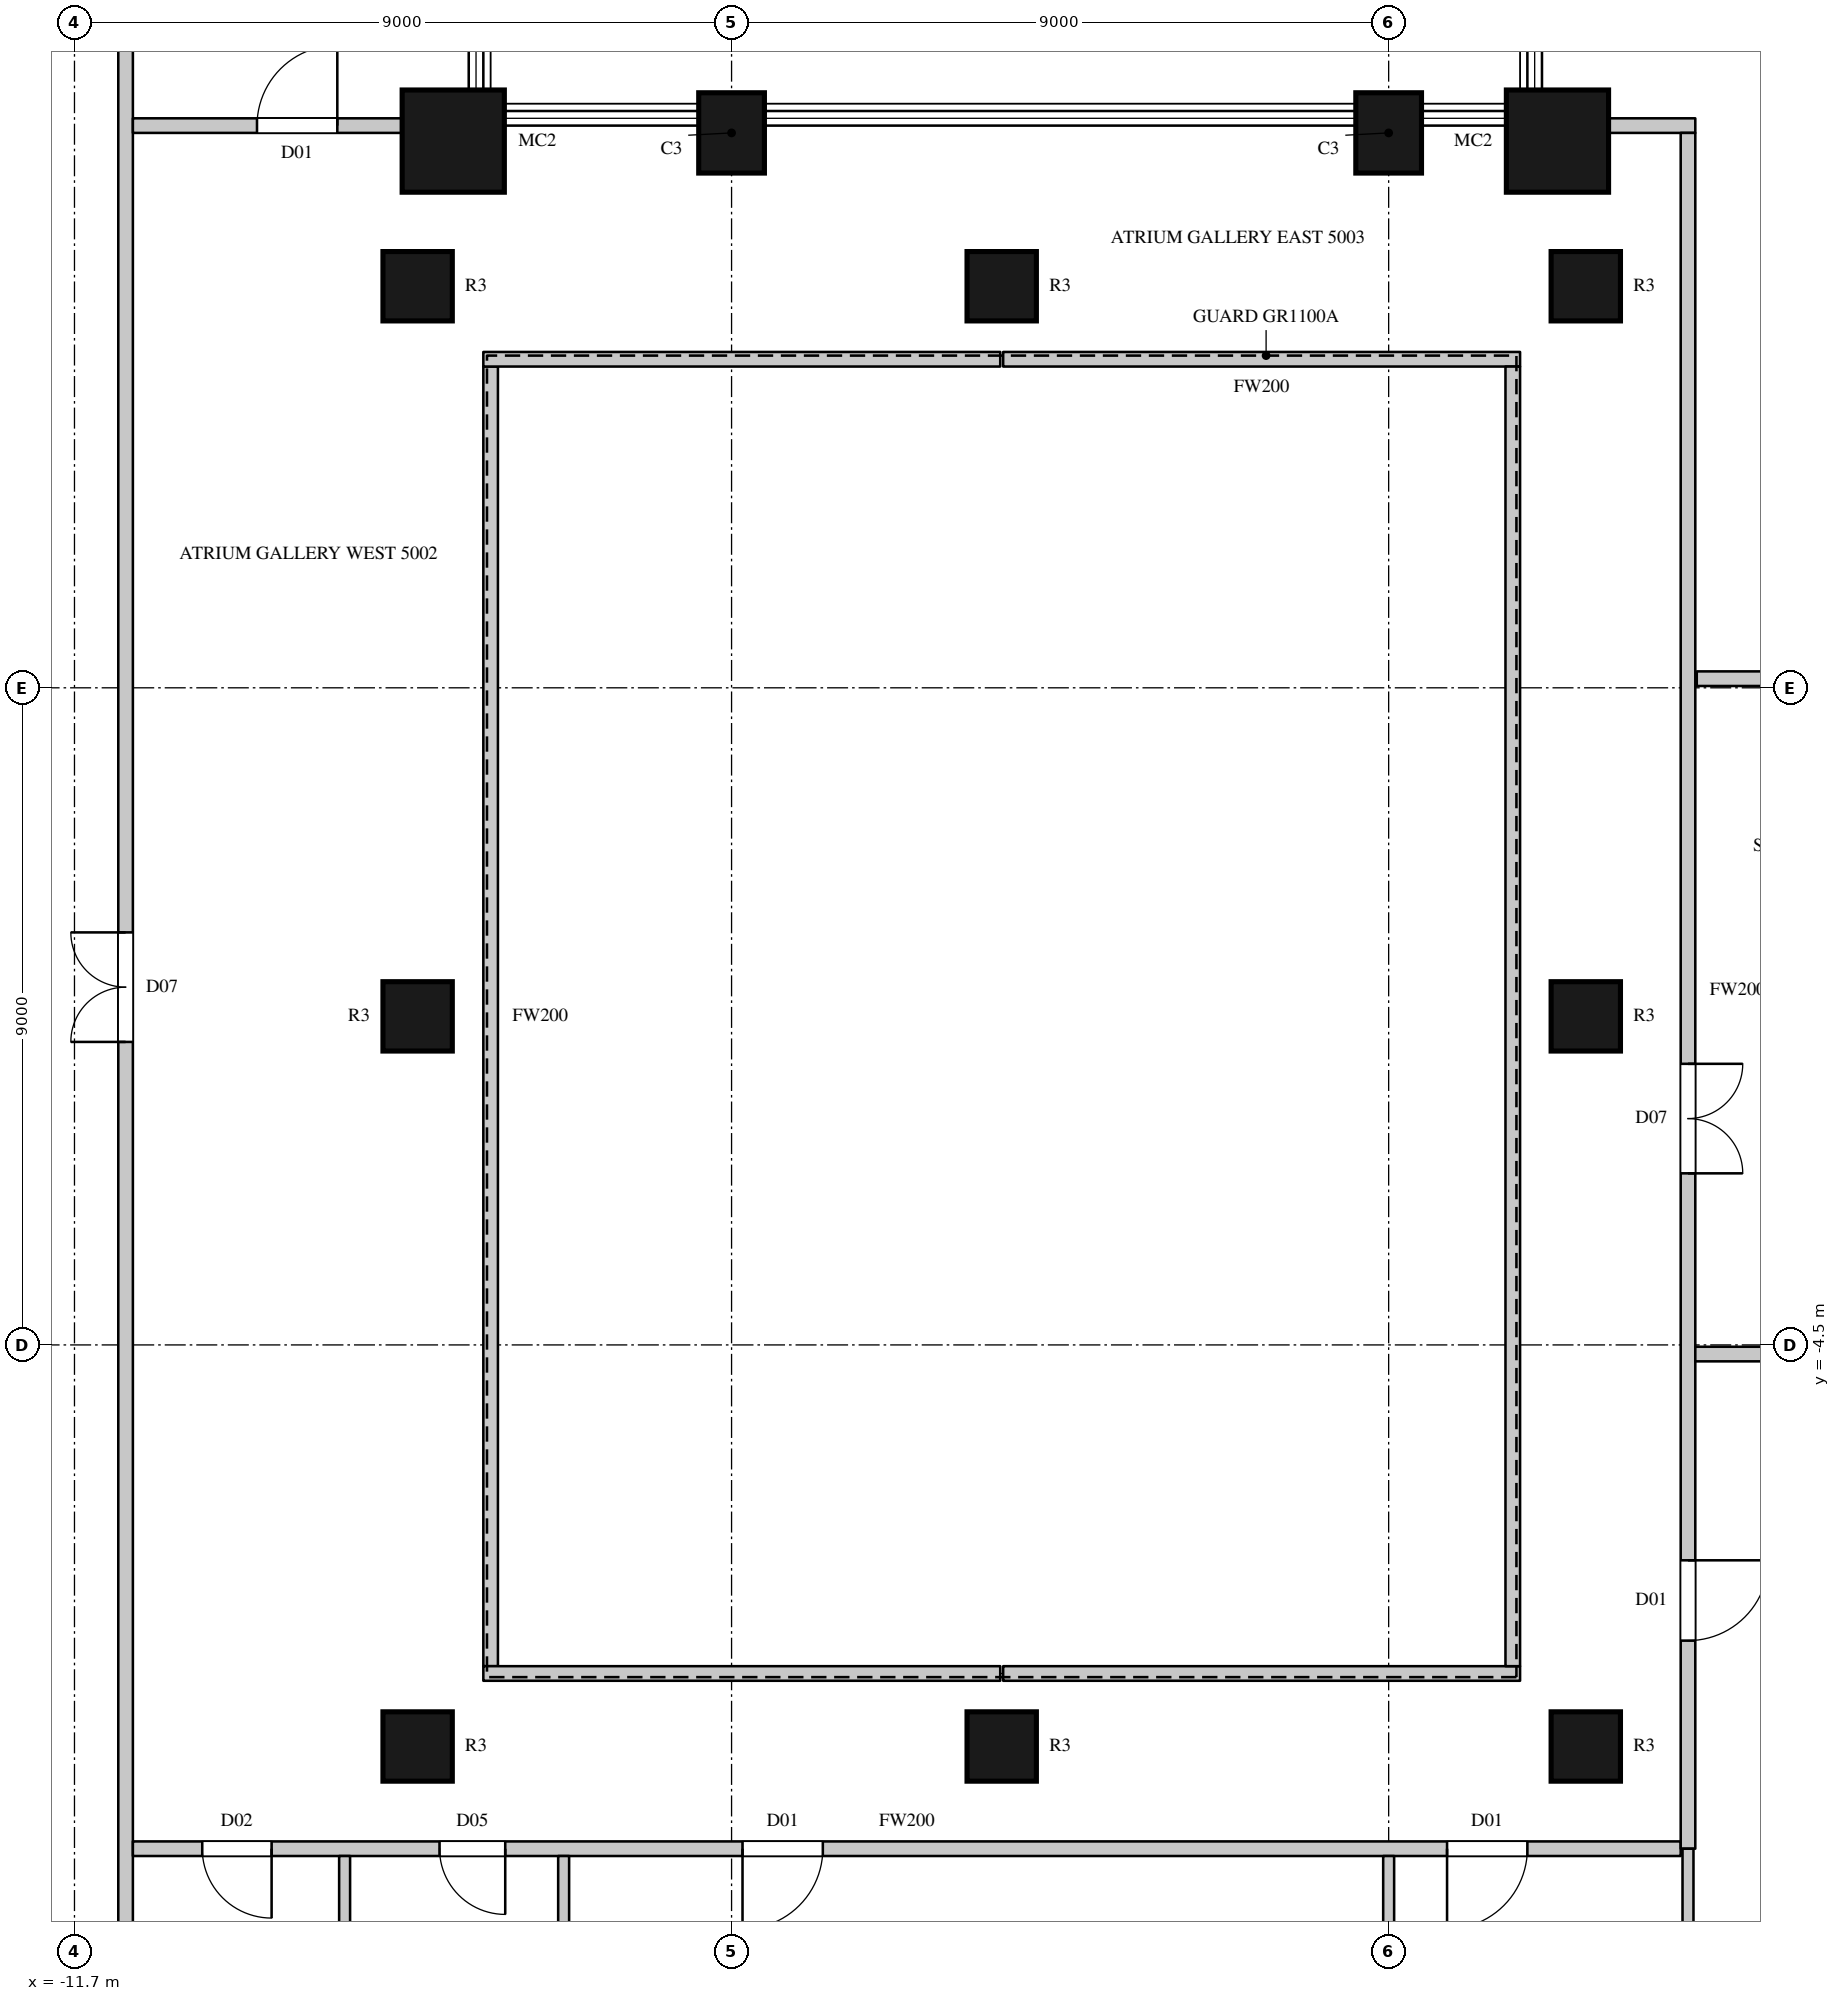
"""IFC4 building model, lengths in metres.
Left out: names, types, materials, properties, quantities, classifications, styles, units other than length and angle.
Written with IfcOpenShell. Run it as: python <this file> out.ifc"""

import sys

from ifc_helpers import new_model, si_unit, direction, frame, frame_2d, origin, origin_2d, place, context, subcontext, project, spatial, rectangle, circle, extrude, element, fill, save


model = new_model("IFC4")
c1 = context("Model", 3, precision=1e-05, world=origin(), true_north=direction((0.0, 1.0)))
c2 = subcontext(c1, "Body", "Model", "MODEL_VIEW")
j1 = project(units=[si_unit("LENGTHUNIT", "METRE"), si_unit("PLANEANGLEUNIT", "RADIAN")], contexts=[c1])
p1 = place(None, origin())
s1 = spatial("IfcSite", under=j1, at=p1, CompositionType="ELEMENT")
p2 = place(p1, origin())
s2 = spatial("IfcBuilding", under=s1, at=p2, CompositionType="ELEMENT")
p3 = place(p2, frame((0.0, 0.0, 226.1)))
s3 = spatial("IfcBuildingStorey", under=s2, at=p3, CompositionType="ELEMENT", Elevation=226.1)
p4 = place(p3, frame((8.612, 11.988, 0.0), z_axis=(0.0, 0.0, 1.0), x_axis=(1.0, 0.0, 0.0)))
e1 = element("IfcColumn", 1, at=p4, inside=s3, PredefinedType="COLUMN", context=c2, shape_type="SweptSolid", body=[
    extrude(circle(Radius=0.7, at=origin_2d()), origin(), (0.0, 0.0, 1.0), 4.1),
])
for number, where, z_axis, x_axis in (
    (2, (6.3, 12.1, 0.0), (0.0, 0.0, 1.0), (-1.0, 0.0, 0.0)),
    (3, (-2.7, 12.1, 0.0), (0.0, 0.0, 1.0), (-1.0, 0.0, 0.0)),
):
    element("IfcColumn", number, at=place(p3, frame(where, z_axis=z_axis, x_axis=x_axis)), inside=s3, PredefinedType="COLUMN", context=c2, shape_type="SweptSolid", body=[
        extrude(rectangle(XDim=0.9, YDim=1.1, at=origin_2d()), origin(), (0.0, 0.0, 1.0), 4.1),
    ])
p5 = place(p3, frame((-6.512, 11.988, 0.0), z_axis=(0.0, 0.0, 1.0), x_axis=(1.0, 0.0, 0.0)))
e4 = element("IfcColumn", 4, at=p5, inside=s3, PredefinedType="COLUMN", context=c2, shape_type="SweptSolid", body=[
    extrude(circle(Radius=0.7, at=origin_2d()), origin(), (0.0, 0.0, 1.0), 4.1),
])
for number, where, z_axis, x_axis in (
    (5, (-7.0, -10.0, 0.0), (0.0, 0.0, 1.0), (1.0, 0.0, 0.0)),
    (6, (-7.0, 0.0, 0.0), (0.0, 0.0, 1.0), (1.0, 0.0, 0.0)),
    (7, (-7.0, 10.0, 0.0), (0.0, 0.0, 1.0), (1.0, 0.0, 0.0)),
    (8, (1.0, -10.0, 0.0), (0.0, 0.0, 1.0), (1.0, 0.0, 0.0)),
    (9, (1.0, 10.0, 0.0), (0.0, 0.0, 1.0), (1.0, 0.0, 0.0)),
    (10, (9.0, -10.0, 0.0), (0.0, 0.0, 1.0), (1.0, 0.0, 0.0)),
    (11, (9.0, 0.0, 0.0), (0.0, 0.0, 1.0), (1.0, 0.0, 0.0)),
    (12, (9.0, 10.0, 0.0), (0.0, 0.0, 1.0), (1.0, 0.0, 0.0)),
):
    element("IfcColumn", number, at=place(p3, frame(where, z_axis=z_axis, x_axis=x_axis)), inside=s3, PredefinedType="COLUMN", context=c2, shape_type="SweptSolid", body=[
        extrude(circle(Radius=0.475, at=origin_2d()), origin(), (0.0, 0.0, 1.0), 4.1),
    ])
p6 = place(p3, frame((13.941, 11.053, 0.0), z_axis=(0.0, 0.0, 1.0), x_axis=(-0.707106781187, 0.707106781187, 0.0)))
e13 = element("IfcWall", 13, at=p6, inside=s3, PredefinedType="SOLIDWALL", context=c2, shape_type="SweptSolid", body=[
    extrude(rectangle(XDim=6.505, YDim=0.45, at=frame_2d((3.252, 0.0))), origin(), (0.0, 0.0, 1.0), 3.8),
])
p7 = place(p6, frame((0.665, 0.0, 0.0)))
e14 = element("IfcOpeningElement", 14, at=p7, cuts=e13, PredefinedType="OPENING", context=c2, shape_type="SweptSolid", body=[
    extrude(rectangle(XDim=1.8, YDim=2.4, at=frame_2d((0.9, 1.2))), frame((0.0, 0.235, 0.0), z_axis=(0.0, -1.0, 0.0), x_axis=(1.0, 0.0, 0.0)), (0.0, 0.0, 1.0), 0.47),
])
p8 = place(p3, frame((-11.0, -14.8, 0.0), z_axis=(0.0, 0.0, 1.0), x_axis=(0.0, 1.0, 0.0)))
e15 = element("IfcWall", 15, at=p8, inside=s3, PredefinedType="PARTITIONING", context=c2, shape_type="SweptSolid", body=[
    extrude(rectangle(XDim=29.6, YDim=0.2, at=frame_2d((14.8, 0.0))), origin(), (0.0, 0.0, 1.0), 3.8),
])
p9 = place(p8, frame((14.45, 0.0, 0.0)))
e16 = element("IfcOpeningElement", 16, at=p9, cuts=e15, PredefinedType="OPENING", context=c2, shape_type="SweptSolid", body=[
    extrude(rectangle(XDim=1.5, YDim=2.4, at=frame_2d((0.75, 1.2))), frame((0.0, 0.11, 0.0), z_axis=(0.0, -1.0, 0.0), x_axis=(1.0, 0.0, 0.0)), (0.0, 0.0, 1.0), 0.22),
])
p10 = place(p3, frame((-10.9, -11.4, 0.0), z_axis=(0.0, 0.0, 1.0), x_axis=(1.0, 0.0, 0.0)))
e17 = element("IfcWall", 17, at=p10, inside=s3, PredefinedType="PARTITIONING", context=c2, shape_type="SweptSolid", body=[
    extrude(rectangle(XDim=21.2, YDim=0.2, at=frame_2d((10.6, 0.0))), origin(), (0.0, 0.0, 1.0), 3.8),
])
p11 = place(p10, frame((0.95, 0.0, 0.0)))
e18 = element("IfcOpeningElement", 18, at=p11, cuts=e17, PredefinedType="OPENING", context=c2, shape_type="SweptSolid", body=[
    extrude(rectangle(XDim=0.95, YDim=2.2, at=frame_2d((0.475, 1.1))), frame((0.0, 0.11, 0.0), z_axis=(0.0, -1.0, 0.0), x_axis=(1.0, 0.0, 0.0)), (0.0, 0.0, 1.0), 0.22),
])
p12 = place(p10, frame((4.2, 0.0, 0.0)))
e19 = element("IfcOpeningElement", 19, at=p12, cuts=e17, PredefinedType="OPENING", context=c2, shape_type="SweptSolid", body=[
    extrude(rectangle(XDim=0.9, YDim=2.2, at=frame_2d((0.45, 1.1))), frame((0.0, 0.11, 0.0), z_axis=(0.0, -1.0, 0.0), x_axis=(1.0, 0.0, 0.0)), (0.0, 0.0, 1.0), 0.22),
])
p13 = place(p10, frame((8.35, 0.0, 0.0)))
e20 = element("IfcOpeningElement", 20, at=p13, cuts=e17, PredefinedType="OPENING", context=c2, shape_type="SweptSolid", body=[
    extrude(rectangle(XDim=1.1, YDim=2.4, at=frame_2d((0.55, 1.2))), frame((0.0, 0.11, 0.0), z_axis=(0.0, -1.0, 0.0), x_axis=(1.0, 0.0, 0.0)), (0.0, 0.0, 1.0), 0.22),
])
p14 = place(p10, frame((18.0, 0.0, 0.0)))
e21 = element("IfcOpeningElement", 21, at=p14, cuts=e17, PredefinedType="OPENING", context=c2, shape_type="SweptSolid", body=[
    extrude(rectangle(XDim=1.1, YDim=2.4, at=frame_2d((0.55, 1.2))), frame((0.0, 0.11, 0.0), z_axis=(0.0, -1.0, 0.0), x_axis=(1.0, 0.0, 0.0)), (0.0, 0.0, 1.0), 0.22),
])
p15 = place(p3, frame((-10.9, 12.2, 0.0), z_axis=(0.0, 0.0, 1.0), x_axis=(1.0, 0.0, 0.0)))
e22 = element("IfcWall", 22, at=p15, inside=s3, PredefinedType="PARTITIONING", context=c2, shape_type="SweptSolid", body=[
    extrude(rectangle(XDim=3.704, YDim=0.2, at=frame_2d((1.852, 0.0))), origin(), (0.0, 0.0, 1.0), 3.8),
])
p16 = place(p15, frame((1.7, 0.0, 0.0)))
e23 = element("IfcOpeningElement", 23, at=p16, cuts=e22, PredefinedType="OPENING", context=c2, shape_type="SweptSolid", body=[
    extrude(rectangle(XDim=1.1, YDim=2.4, at=frame_2d((0.55, 1.2))), frame((0.0, 0.11, 0.0), z_axis=(0.0, -1.0, 0.0), x_axis=(1.0, 0.0, 0.0)), (0.0, 0.0, 1.0), 0.22),
])
p17 = place(p3, frame((-6.0, -8.9, 0.0), z_axis=(0.0, 0.0, 1.0), x_axis=(0.0, 1.0, 0.0)))
e24 = element("IfcWall", 24, at=p17, inside=s3, PredefinedType="PARTITIONING", context=c2, shape_type="SweptSolid", body=[
    extrude(rectangle(XDim=17.8, YDim=0.2, at=frame_2d((8.9, 0.0))), origin(), (0.0, 0.0, 1.0), 3.8),
])
for number, where, z_axis, x_axis in (
    (25, (-6.1, -9.0, 0.0), (0.0, 0.0, 1.0), (1.0, 0.0, 0.0)),
    (26, (-6.1, 9.0, 0.0), (0.0, 0.0, 1.0), (1.0, 0.0, 0.0)),
    (27, (1.02, -9.0, 0.0), (0.0, 0.0, 1.0), (1.0, 0.0, 0.0)),
    (28, (1.02, 9.0, 0.0), (0.0, 0.0, 1.0), (1.0, 0.0, 0.0)),
):
    element("IfcWall", number, at=place(p3, frame(where, z_axis=z_axis, x_axis=x_axis)), inside=s3, PredefinedType="PARTITIONING", context=c2, shape_type="SweptSolid", body=[
        extrude(rectangle(XDim=7.08, YDim=0.2, at=frame_2d((3.54, 0.0))), origin(), (0.0, 0.0, 1.0), 3.8),
    ])
p18 = place(p3, frame((8.0, -8.9, 0.0), z_axis=(0.0, 0.0, 1.0), x_axis=(0.0, 1.0, 0.0)))
e29 = element("IfcWall", 29, at=p18, inside=s3, PredefinedType="PARTITIONING", context=c2, shape_type="SweptSolid", body=[
    extrude(rectangle(XDim=17.8, YDim=0.2, at=frame_2d((8.9, 0.0))), origin(), (0.0, 0.0, 1.0), 3.8),
])
p19 = place(p3, frame((9.296, 12.2, 0.0), z_axis=(0.0, 0.0, 1.0), x_axis=(1.0, 0.0, 0.0)))
e30 = element("IfcWall", 30, at=p19, inside=s3, PredefinedType="PARTITIONING", context=c2, shape_type="SweptSolid", body=[
    extrude(rectangle(XDim=1.204, YDim=0.2, at=frame_2d((0.602, 0.0))), origin(), (0.0, 0.0, 1.0), 3.8),
])
p20 = place(p3, frame((10.4, -11.4, 0.0), z_axis=(0.0, 0.0, 1.0), x_axis=(0.0, 1.0, 0.0)))
e31 = element("IfcWall", 31, at=p20, inside=s3, PredefinedType="PARTITIONING", context=c2, shape_type="SweptSolid", body=[
    extrude(rectangle(XDim=23.5, YDim=0.2, at=frame_2d((11.75, 0.0))), origin(), (0.0, 0.0, 1.0), 3.8),
])
p21 = place(p20, frame((9.25, 0.0, 0.0)))
e32 = element("IfcOpeningElement", 32, at=p21, cuts=e31, PredefinedType="OPENING", context=c2, shape_type="SweptSolid", body=[
    extrude(rectangle(XDim=1.5, YDim=2.4, at=frame_2d((0.75, 1.2))), frame((0.0, 0.11, 0.0), z_axis=(0.0, -1.0, 0.0), x_axis=(1.0, 0.0, 0.0)), (0.0, 0.0, 1.0), 0.22),
])
p22 = place(p20, frame((2.85, 0.0, 0.0)))
e33 = element("IfcOpeningElement", 33, at=p22, cuts=e31, PredefinedType="OPENING", context=c2, shape_type="SweptSolid", body=[
    extrude(rectangle(XDim=1.1, YDim=2.4, at=frame_2d((0.55, 1.2))), frame((0.0, 0.11, 0.0), z_axis=(0.0, -1.0, 0.0), x_axis=(1.0, 0.0, 0.0)), (0.0, 0.0, 1.0), 0.22),
])
p23 = place(p3, frame((10.5, -4.625, 0.0), z_axis=(0.0, 0.0, 1.0), x_axis=(1.0, 0.0, 0.0)))
e34 = element("IfcWall", 34, at=p23, inside=s3, PredefinedType="PARTITIONING", context=c2, shape_type="SweptSolid", body=[
    extrude(rectangle(XDim=4.175, YDim=0.2, at=frame_2d((2.087, 0.0))), origin(), (0.0, 0.0, 1.0), 3.8),
])
p24 = place(p3, frame((10.52, 4.625, 0.0), z_axis=(0.0, 0.0, 1.0), x_axis=(1.0, 0.0, 0.0)))
e35 = element("IfcWall", 35, at=p24, inside=s3, PredefinedType="PARTITIONING", context=c2, shape_type="SweptSolid", body=[
    extrude(rectangle(XDim=4.135, YDim=0.2, at=frame_2d((2.067, 0.0))), origin(), (0.0, 0.0, 1.0), 3.8),
])
for number, where, z_axis, x_axis in (
    (36, (-8.0, -16.7, 0.0), (0.0, 0.0, 1.0), (0.0, 1.0, 0.0)),
    (37, (-5.0, -16.7, 0.0), (0.0, 0.0, 1.0), (0.0, 1.0, 0.0)),
):
    element("IfcWall", number, at=place(p3, frame(where, z_axis=z_axis, x_axis=x_axis)), inside=s3, PredefinedType="PARTITIONING", context=c2, shape_type="SweptSolid", body=[
        extrude(rectangle(XDim=5.2, YDim=0.15, at=frame_2d((2.6, 0.0))), origin(), (0.0, 0.0, 1.0), 3.8),
    ])
p25 = place(p3, frame((6.3, -16.05, 0.0), z_axis=(0.0, 0.0, 1.0), x_axis=(0.0, 1.0, 0.0)))
e38 = element("IfcWall", 38, at=p25, inside=s3, PredefinedType="PARTITIONING", context=c2, shape_type="SweptSolid", body=[
    extrude(rectangle(XDim=4.55, YDim=0.15, at=frame_2d((2.275, 0.0))), origin(), (0.0, 0.0, 1.0), 3.25),
])
p26 = place(p3, frame((10.4, -16.7, 0.0), z_axis=(0.0, 0.0, 1.0), x_axis=(0.0, 1.0, 0.0)))
e39 = element("IfcWall", 39, at=p26, inside=s3, PredefinedType="PARTITIONING", context=c2, shape_type="SweptSolid", body=[
    extrude(rectangle(XDim=5.3, YDim=0.15, at=frame_2d((2.65, 0.0))), origin(), (0.0, 0.0, 1.0), 3.8),
])
p27 = place(p9, origin())
e40 = element("IfcDoor", 40, at=p27, inside=s3, OperationType="DOUBLE_DOOR_SINGLE_SWING", PredefinedType="DOOR", context=c2, shape_type="SweptSolid", body=[
    extrude(rectangle(XDim=1.5, YDim=2.4, at=frame_2d((0.75, 1.2))), frame((0.0, 0.025, 0.0), z_axis=(0.0, -1.0, 0.0), x_axis=(1.0, 0.0, 0.0)), (0.0, 0.0, 1.0), 0.05),
])
fill(e16, e40)
p28 = place(p21, origin())
e41 = element("IfcDoor", 41, at=p28, inside=s3, OperationType="DOUBLE_DOOR_SINGLE_SWING", PredefinedType="DOOR", context=c2, shape_type="SweptSolid", body=[
    extrude(rectangle(XDim=1.5, YDim=2.4, at=frame_2d((0.75, 1.2))), frame((0.0, 0.025, 0.0), z_axis=(0.0, -1.0, 0.0), x_axis=(1.0, 0.0, 0.0)), (0.0, 0.0, 1.0), 0.05),
])
fill(e32, e41)
p29 = place(p11, origin())
e42 = element("IfcDoor", 42, at=p29, inside=s3, OperationType="SINGLE_SWING_LEFT", PredefinedType="DOOR", context=c2, shape_type="SweptSolid", body=[
    extrude(rectangle(XDim=0.95, YDim=2.2, at=frame_2d((0.475, 1.1))), frame((0.0, 0.025, 0.0), z_axis=(0.0, -1.0, 0.0), x_axis=(1.0, 0.0, 0.0)), (0.0, 0.0, 1.0), 0.05),
])
fill(e18, e42)
p30 = place(p12, origin())
e43 = element("IfcDoor", 43, at=p30, inside=s3, OperationType="SINGLE_SWING_LEFT", PredefinedType="DOOR", context=c2, shape_type="SweptSolid", body=[
    extrude(rectangle(XDim=0.9, YDim=2.2, at=frame_2d((0.45, 1.1))), frame((0.0, 0.025, 0.0), z_axis=(0.0, -1.0, 0.0), x_axis=(1.0, 0.0, 0.0)), (0.0, 0.0, 1.0), 0.05),
])
fill(e19, e43)
p31 = place(p16, origin())
e44 = element("IfcDoor", 44, at=p31, inside=s3, OperationType="SINGLE_SWING_RIGHT", PredefinedType="DOOR", context=c2, shape_type="SweptSolid", body=[
    extrude(rectangle(XDim=1.1, YDim=2.4, at=frame_2d((0.55, 1.2))), frame((0.0, 0.025, 0.0), z_axis=(0.0, -1.0, 0.0), x_axis=(1.0, 0.0, 0.0)), (0.0, 0.0, 1.0), 0.05),
])
fill(e23, e44)
p32 = place(p13, origin())
e45 = element("IfcDoor", 45, at=p32, inside=s3, OperationType="SINGLE_SWING_RIGHT", PredefinedType="DOOR", context=c2, shape_type="SweptSolid", body=[
    extrude(rectangle(XDim=1.1, YDim=2.4, at=frame_2d((0.55, 1.2))), frame((0.0, 0.025, 0.0), z_axis=(0.0, -1.0, 0.0), x_axis=(1.0, 0.0, 0.0)), (0.0, 0.0, 1.0), 0.05),
])
fill(e20, e45)
p33 = place(p14, origin())
e46 = element("IfcDoor", 46, at=p33, inside=s3, OperationType="SINGLE_SWING_RIGHT", PredefinedType="DOOR", context=c2, shape_type="SweptSolid", body=[
    extrude(rectangle(XDim=1.1, YDim=2.4, at=frame_2d((0.55, 1.2))), frame((0.0, 0.025, 0.0), z_axis=(0.0, -1.0, 0.0), x_axis=(1.0, 0.0, 0.0)), (0.0, 0.0, 1.0), 0.05),
])
fill(e21, e46)
p34 = place(p22, origin())
e47 = element("IfcDoor", 47, at=p34, inside=s3, OperationType="SINGLE_SWING_LEFT", PredefinedType="DOOR", context=c2, shape_type="SweptSolid", body=[
    extrude(rectangle(XDim=1.1, YDim=2.4, at=frame_2d((0.55, 1.2))), frame((0.0, 0.025, 0.0), z_axis=(0.0, -1.0, 0.0), x_axis=(1.0, 0.0, 0.0)), (0.0, 0.0, 1.0), 0.05),
])
fill(e33, e47)
save(model, sys.argv[1])
